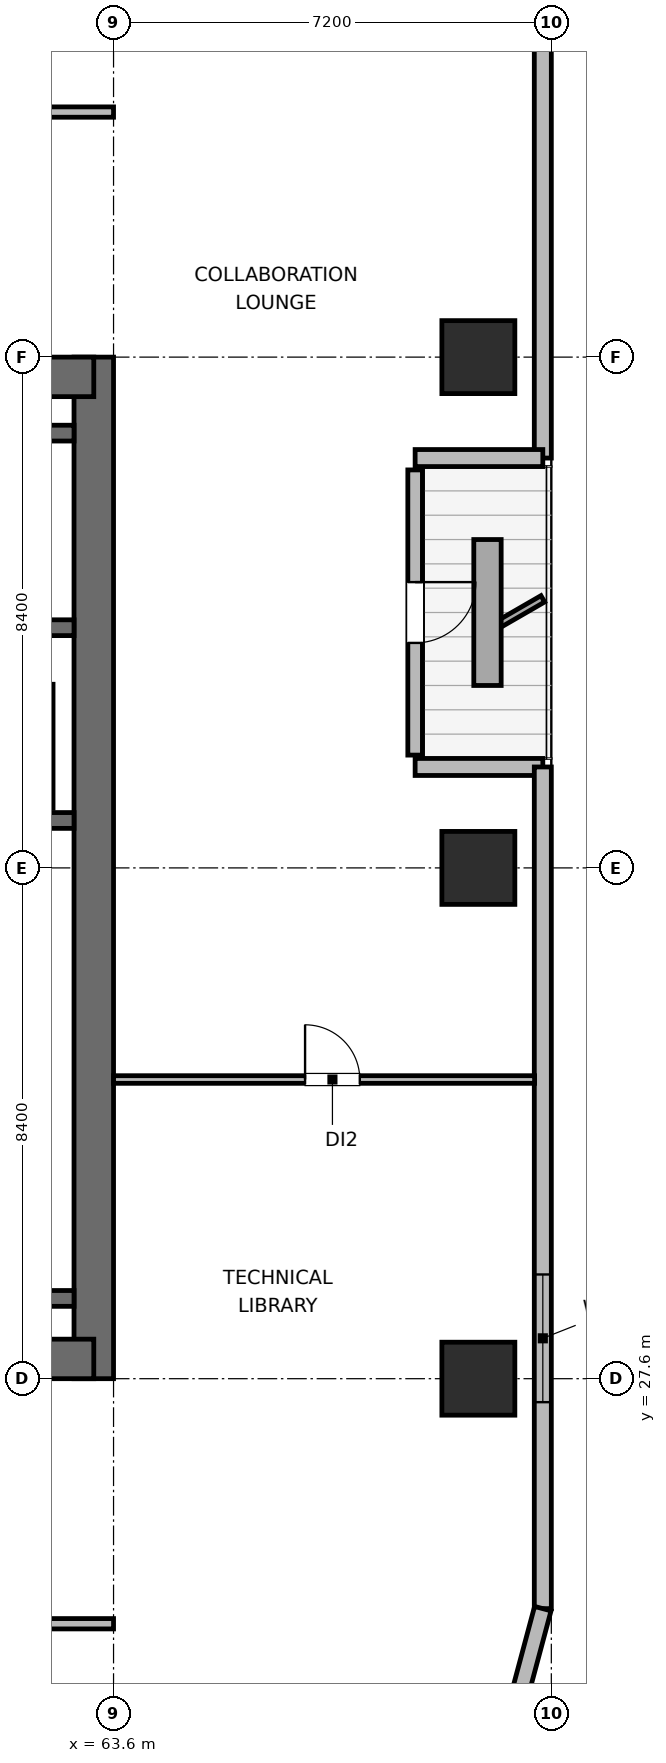
"""IFC4 building model, lengths in metres.
Left out: names, types, materials, properties, quantities, classifications, styles, units other than length and angle.
Written with IfcOpenShell. Run it as: python <this file> out.ifc"""

import sys

from ifc_helpers import new_model, si_unit, direction, frame, frame_2d, origin, origin_2d, place, context, subcontext, project, spatial, rectangle, extrude, element, fill, save


model = new_model("IFC4")
c1 = context("Model", 3, precision=1e-05, world=origin(), true_north=direction((0.0, 1.0)))
c2 = subcontext(c1, "Body", "Model", "MODEL_VIEW")
j1 = project(units=[si_unit("LENGTHUNIT", "METRE"), si_unit("PLANEANGLEUNIT", "RADIAN")], contexts=[c1])
p1 = place(None, origin())
s1 = spatial("IfcSite", under=j1, at=p1, CompositionType="ELEMENT")
p2 = place(p1, origin())
s2 = spatial("IfcBuilding", under=s1, at=p2, CompositionType="ELEMENT")
p3 = place(p2, frame((0.0, 0.0, 219.3)))
s3 = spatial("IfcBuildingStorey", under=s2, at=p3, CompositionType="ELEMENT", Elevation=219.3)
p4 = place(p3, frame((63.275, 27.6, 0.0), z_axis=(0.0, 0.0, 1.0), x_axis=(0.0, 1.0, 0.0)))
e1 = element("IfcWall", 1, at=p4, inside=s3, PredefinedType="SHEAR", context=c2, shape_type="SweptSolid", body=[
    extrude(rectangle(XDim=16.8, YDim=0.65, at=frame_2d((8.4, 0.0))), origin(), (0.0, 0.0, 1.0), 3.9),
])
p5 = place(p3, frame((53.925, 27.925, 0.0), z_axis=(0.0, 0.0, 1.0), x_axis=(1.0, 0.0, 0.0)))
e2 = element("IfcWall", 2, at=p5, inside=s3, PredefinedType="SHEAR", context=c2, shape_type="SweptSolid", body=[
    extrude(rectangle(XDim=9.35, YDim=0.65, at=frame_2d((4.675, 0.0))), origin(), (0.0, 0.0, 1.0), 3.9),
])
p6 = place(p5, frame((3.975, 0.0, 0.0)))
e3 = element("IfcOpeningElement", 3, at=p6, cuts=e2, PredefinedType="OPENING", context=c2, shape_type="SweptSolid", body=[
    extrude(rectangle(XDim=1.05, YDim=2.04, at=frame_2d((0.525, 1.02))), frame((0.0, 0.335, 0.0), z_axis=(0.0, -1.0, 0.0), x_axis=(1.0, 0.0, 0.0)), (0.0, 0.0, 1.0), 0.67),
])
p7 = place(p3, frame((53.925, 44.075, 0.0), z_axis=(0.0, 0.0, 1.0), x_axis=(1.0, 0.0, 0.0)))
e4 = element("IfcWall", 4, at=p7, inside=s3, PredefinedType="SHEAR", context=c2, shape_type="SweptSolid", body=[
    extrude(rectangle(XDim=9.35, YDim=0.65, at=frame_2d((4.675, 0.0))), origin(), (0.0, 0.0, 1.0), 3.9),
])
for number, where, z_axis, x_axis in (
    (5, (58.89, 28.92, 0.0), (0.0, 0.0, 1.0), (1.0, 0.0, 0.0)),
    (6, (58.89, 36.78, 0.0), (0.0, 0.0, 1.0), (1.0, 0.0, 0.0)),
):
    element("IfcWall", number, at=place(p3, frame(where, z_axis=z_axis, x_axis=x_axis)), inside=s3, PredefinedType="SHEAR", context=c2, shape_type="SweptSolid", body=[
        extrude(rectangle(XDim=4.06, YDim=0.26, at=frame_2d((2.03, 0.0))), origin(), (0.0, 0.0, 1.0), 3.9),
    ])
p8 = place(p3, frame((54.25, 39.95, 0.0), z_axis=(0.0, 0.0, 1.0), x_axis=(1.0, 0.0, 0.0)))
e7 = element("IfcWall", 7, at=p8, inside=s3, PredefinedType="SHEAR", context=c2, shape_type="SweptSolid", body=[
    extrude(rectangle(XDim=8.7, YDim=0.26, at=frame_2d((4.35, 0.0))), origin(), (0.0, 0.0, 1.0), 3.9),
])
p9 = place(p8, frame((0.95, 0.0, 0.0)))
e8 = element("IfcOpeningElement", 8, at=p9, cuts=e7, PredefinedType="OPENING", context=c2, shape_type="SweptSolid", body=[
    extrude(rectangle(XDim=1.0, YDim=2.04, at=frame_2d((0.5, 1.02))), frame((0.0, 0.14, 0.0), z_axis=(0.0, -1.0, 0.0), x_axis=(1.0, 0.0, 0.0)), (0.0, 0.0, 1.0), 0.28),
])
p10 = place(p3, frame((54.25, 43.15, 0.0), z_axis=(0.0, 0.0, 1.0), x_axis=(1.0, 0.0, 0.0)))
e9 = element("IfcWall", 9, at=p10, inside=s3, PredefinedType="SHEAR", context=c2, shape_type="SweptSolid", body=[
    extrude(rectangle(XDim=8.7, YDim=0.26, at=frame_2d((4.35, 0.0))), origin(), (0.0, 0.0, 1.0), 3.9),
])
for number, where, z_axis, x_axis in (
    (10, (69.6, 27.6, 0.0), (0.0, 0.0, 1.0), (1.0, 0.0, 0.0)),
    (11, (69.6, 36.0, 0.0), (0.0, 0.0, 1.0), (1.0, 0.0, 0.0)),
    (12, (69.6, 44.4, 0.0), (0.0, 0.0, 1.0), (1.0, 0.0, 0.0)),
):
    element("IfcColumn", number, at=place(p3, frame(where, z_axis=z_axis, x_axis=x_axis)), inside=s3, PredefinedType="COLUMN", context=c2, shape_type="SweptSolid", body=[
        extrude(rectangle(XDim=1.2, YDim=1.2, at=origin_2d()), origin(), (0.0, 0.0, 1.0), 3.9),
    ])
p11 = place(p3, frame((70.66, 57.182, 0.0), z_axis=(0.0, 0.0, 1.0), x_axis=(0.0, -1.0, 0.0)))
e13 = element("IfcWall", 13, at=p11, inside=s3, PredefinedType="SOLIDWALL", context=c2, shape_type="SweptSolid", body=[
    extrude(rectangle(XDim=14.442, YDim=0.28, at=frame_2d((7.221, 0.0))), origin(), (0.0, 0.0, 1.0), 3.68),
])
p12 = place(p3, frame((70.66, 42.74, 0.0), z_axis=(0.0, 0.0, 1.0), x_axis=(-1.0, 0.0, 0.0)))
e14 = element("IfcWall", 14, at=p12, inside=s3, PredefinedType="SOLIDWALL", context=c2, shape_type="SweptSolid", body=[
    extrude(rectangle(XDim=2.1, YDim=0.28, at=frame_2d((1.05, 0.0))), origin(), (0.0, 0.0, 1.0), 3.116),
])
p13 = place(p3, frame((68.56, 42.545, 0.0), z_axis=(0.0, 0.0, 1.0), x_axis=(0.0, -1.0, 0.0)))
e15 = element("IfcWall", 15, at=p13, inside=s3, PredefinedType="SOLIDWALL", context=c2, shape_type="SweptSolid", body=[
    extrude(rectangle(XDim=4.69, YDim=0.24, at=frame_2d((2.345, 0.0))), origin(), (0.0, 0.0, 1.0), 3.248),
])
p14 = place(p13, frame((1.845, 0.0, 0.0)))
e16 = element("IfcOpeningElement", 16, at=p14, cuts=e15, PredefinedType="OPENING", context=c2, shape_type="SweptSolid", body=[
    extrude(rectangle(XDim=1.0, YDim=2.02, at=frame_2d((0.5, 1.01))), frame((0.0, 0.13, 0.0), z_axis=(0.0, -1.0, 0.0), x_axis=(1.0, 0.0, 0.0)), (0.0, 0.0, 1.0), 0.26),
])
p15 = place(p3, frame((68.56, 37.66, 0.0), z_axis=(0.0, 0.0, 1.0), x_axis=(1.0, 0.0, 0.0)))
e17 = element("IfcWall", 17, at=p15, inside=s3, PredefinedType="SOLIDWALL", context=c2, shape_type="SweptSolid", body=[
    extrude(rectangle(XDim=2.1, YDim=0.28, at=frame_2d((1.05, 0.0))), origin(), (0.0, 0.0, 1.0), 3.116),
])
p16 = place(p3, frame((70.66, 37.66, 0.0), z_axis=(0.0, 0.0, 1.0), x_axis=(0.0, -1.0, 0.0)))
e18 = element("IfcWall", 18, at=p16, inside=s3, PredefinedType="SOLIDWALL", context=c2, shape_type="SweptSolid", body=[
    extrude(rectangle(XDim=13.842, YDim=0.28, at=frame_2d((6.921, 0.0))), origin(), (0.0, 0.0, 1.0), 3.68),
])
p17 = place(p16, frame((8.346, 0.0, 0.85)))
e19 = element("IfcOpeningElement", 19, at=p17, cuts=e18, PredefinedType="OPENING", context=c2, shape_type="SweptSolid", body=[
    extrude(rectangle(XDim=2.1, YDim=1.05, at=frame_2d((1.05, 0.525))), frame((0.0, 0.15, 0.0), z_axis=(0.0, -1.0, 0.0), x_axis=(1.0, 0.0, 0.0)), (0.0, 0.0, 1.0), 0.3),
])
p18 = place(p3, frame((70.66, 23.818, 0.0), z_axis=(0.0, 0.0, 1.0), x_axis=(-0.2588904131, -0.965906700466, 0.0)))
e20 = element("IfcWall", 20, at=p18, inside=s3, PredefinedType="SOLIDWALL", context=c2, shape_type="SweptSolid", body=[
    extrude(rectangle(XDim=2.636, YDim=0.28, at=frame_2d((1.318, 0.0))), origin(), (0.0, 0.0, 1.0), 3.68),
])
p19 = place(p3, frame((62.5, 36.98, 0.0), z_axis=(0.0, 0.0, 1.0), x_axis=(0.0, 1.0, 0.0)))
e21 = element("IfcWall", 21, at=p19, inside=s3, PredefinedType="PARTITIONING", context=c2, shape_type="SweptSolid", body=[
    extrude(rectangle(XDim=2.04, YDim=0.21, at=frame_2d((1.02, 0.0))), origin(), (0.0, 0.0, 1.0), 3.68),
])
p20 = place(p3, frame((28.7, 23.57, 0.0), z_axis=(0.0, 0.0, 1.0), x_axis=(1.0, 0.0, 0.0)))
e22 = element("IfcWall", 22, at=p20, inside=s3, PredefinedType="PARTITIONING", context=c2, shape_type="SweptSolid", body=[
    extrude(rectangle(XDim=34.9, YDim=0.17, at=frame_2d((17.45, 0.0))), origin(), (0.0, 0.0, 1.0), 3.68),
])
p21 = place(p20, frame((5.54, 0.0, 0.0)))
e23 = element("IfcOpeningElement", 23, at=p21, cuts=e22, PredefinedType="OPENING", context=c2, shape_type="SweptSolid", body=[
    extrude(rectangle(XDim=0.95, YDim=2.04, at=frame_2d((0.475, 1.02))), frame((0.0, 0.095, 0.0), z_axis=(0.0, -1.0, 0.0), x_axis=(1.0, 0.0, 0.0)), (0.0, 0.0, 1.0), 0.19),
])
p22 = place(p20, frame((16.975, 0.0, 0.0)))
e24 = element("IfcOpeningElement", 24, at=p22, cuts=e22, PredefinedType="OPENING", context=c2, shape_type="SweptSolid", body=[
    extrude(rectangle(XDim=0.95, YDim=2.04, at=frame_2d((0.475, 1.02))), frame((0.0, 0.095, 0.0), z_axis=(0.0, -1.0, 0.0), x_axis=(1.0, 0.0, 0.0)), (0.0, 0.0, 1.0), 0.19),
])
p23 = place(p20, frame((28.41, 0.0, 0.0)))
e25 = element("IfcOpeningElement", 25, at=p23, cuts=e22, PredefinedType="OPENING", context=c2, shape_type="SweptSolid", body=[
    extrude(rectangle(XDim=0.95, YDim=2.04, at=frame_2d((0.475, 1.02))), frame((0.0, 0.095, 0.0), z_axis=(0.0, -1.0, 0.0), x_axis=(1.0, 0.0, 0.0)), (0.0, 0.0, 1.0), 0.19),
])
p24 = place(p3, frame((28.7, 48.43, 0.0), z_axis=(0.0, 0.0, 1.0), x_axis=(1.0, 0.0, 0.0)))
e26 = element("IfcWall", 26, at=p24, inside=s3, PredefinedType="PARTITIONING", context=c2, shape_type="SweptSolid", body=[
    extrude(rectangle(XDim=34.9, YDim=0.17, at=frame_2d((17.45, 0.0))), origin(), (0.0, 0.0, 1.0), 3.68),
])
p25 = place(p24, frame((4.025, 0.0, 0.0)))
e27 = element("IfcOpeningElement", 27, at=p25, cuts=e26, PredefinedType="OPENING", context=c2, shape_type="SweptSolid", body=[
    extrude(rectangle(XDim=0.95, YDim=2.04, at=frame_2d((0.475, 1.02))), frame((0.0, 0.095, 0.0), z_axis=(0.0, -1.0, 0.0), x_axis=(1.0, 0.0, 0.0)), (0.0, 0.0, 1.0), 0.19),
])
p26 = place(p24, frame((9.96, 0.0, 0.0)))
e28 = element("IfcOpeningElement", 28, at=p26, cuts=e26, PredefinedType="OPENING", context=c2, shape_type="SweptSolid", body=[
    extrude(rectangle(XDim=0.95, YDim=2.04, at=frame_2d((0.475, 1.02))), frame((0.0, 0.095, 0.0), z_axis=(0.0, -1.0, 0.0), x_axis=(1.0, 0.0, 0.0)), (0.0, 0.0, 1.0), 0.19),
])
p27 = place(p24, frame((15.94, 0.0, 0.0)))
e29 = element("IfcOpeningElement", 29, at=p27, cuts=e26, PredefinedType="OPENING", context=c2, shape_type="SweptSolid", body=[
    extrude(rectangle(XDim=0.95, YDim=2.04, at=frame_2d((0.475, 1.02))), frame((0.0, 0.095, 0.0), z_axis=(0.0, -1.0, 0.0), x_axis=(1.0, 0.0, 0.0)), (0.0, 0.0, 1.0), 0.19),
])
p28 = place(p24, frame((23.35, 0.0, 0.0)))
e30 = element("IfcOpeningElement", 30, at=p28, cuts=e26, PredefinedType="OPENING", context=c2, shape_type="SweptSolid", body=[
    extrude(rectangle(XDim=0.95, YDim=2.04, at=frame_2d((0.475, 1.02))), frame((0.0, 0.095, 0.0), z_axis=(0.0, -1.0, 0.0), x_axis=(1.0, 0.0, 0.0)), (0.0, 0.0, 1.0), 0.19),
])
p29 = place(p24, frame((30.32, 0.0, 0.0)))
e31 = element("IfcOpeningElement", 31, at=p29, cuts=e26, PredefinedType="OPENING", context=c2, shape_type="SweptSolid", body=[
    extrude(rectangle(XDim=0.95, YDim=2.04, at=frame_2d((0.475, 1.02))), frame((0.0, 0.095, 0.0), z_axis=(0.0, -1.0, 0.0), x_axis=(1.0, 0.0, 0.0)), (0.0, 0.0, 1.0), 0.19),
])
p30 = place(p3, frame((63.6, 32.52, 0.0), z_axis=(0.0, 0.0, 1.0), x_axis=(1.0, 0.0, 0.0)))
e32 = element("IfcWall", 32, at=p30, inside=s3, PredefinedType="PARTITIONING", context=c2, shape_type="SweptSolid", body=[
    extrude(rectangle(XDim=6.925, YDim=0.125, at=frame_2d((3.462, 0.0))), origin(), (0.0, 0.0, 1.0), 3.68),
])
p31 = place(p30, frame((3.15, 0.0, 0.0)))
e33 = element("IfcOpeningElement", 33, at=p31, cuts=e32, PredefinedType="OPENING", context=c2, shape_type="SweptSolid", body=[
    extrude(rectangle(XDim=0.9, YDim=2.02, at=frame_2d((0.45, 1.01))), frame((0.0, 0.073, 0.0), z_axis=(0.0, -1.0, 0.0), x_axis=(1.0, 0.0, 0.0)), (0.0, 0.0, 1.0), 0.145),
])
p32 = place(p14, origin())
e34 = element("IfcDoor", 34, at=p32, inside=s3, OperationType="SINGLE_SWING_LEFT", PredefinedType="DOOR", context=c2, shape_type="SweptSolid", body=[
    extrude(rectangle(XDim=1.0, YDim=2.02, at=frame_2d((0.5, 1.01))), frame((0.0, 0.025, 0.0), z_axis=(0.0, -1.0, 0.0), x_axis=(1.0, 0.0, 0.0)), (0.0, 0.0, 1.0), 0.05),
])
fill(e16, e34)
p33 = place(p17, origin())
e35 = element("IfcWindow", 35, at=p33, inside=s3, PartitioningType="SINGLE_PANEL", PredefinedType="WINDOW", context=c2, shape_type="SweptSolid", body=[
    extrude(rectangle(XDim=2.1, YDim=1.05, at=frame_2d((1.05, 0.525))), frame((0.0, 0.03, 0.0), z_axis=(0.0, -1.0, 0.0), x_axis=(1.0, 0.0, 0.0)), (0.0, 0.0, 1.0), 0.06),
])
fill(e19, e35)
p34 = place(p31, origin())
e36 = element("IfcDoor", 36, at=p34, inside=s3, OperationType="SINGLE_SWING_LEFT", PredefinedType="DOOR", context=c2, shape_type="SweptSolid", body=[
    extrude(rectangle(XDim=0.9, YDim=2.02, at=frame_2d((0.45, 1.01))), frame((0.0, 0.025, 0.0), z_axis=(0.0, -1.0, 0.0), x_axis=(1.0, 0.0, 0.0)), (0.0, 0.0, 1.0), 0.05),
])
fill(e33, e36)
save(model, sys.argv[1])
